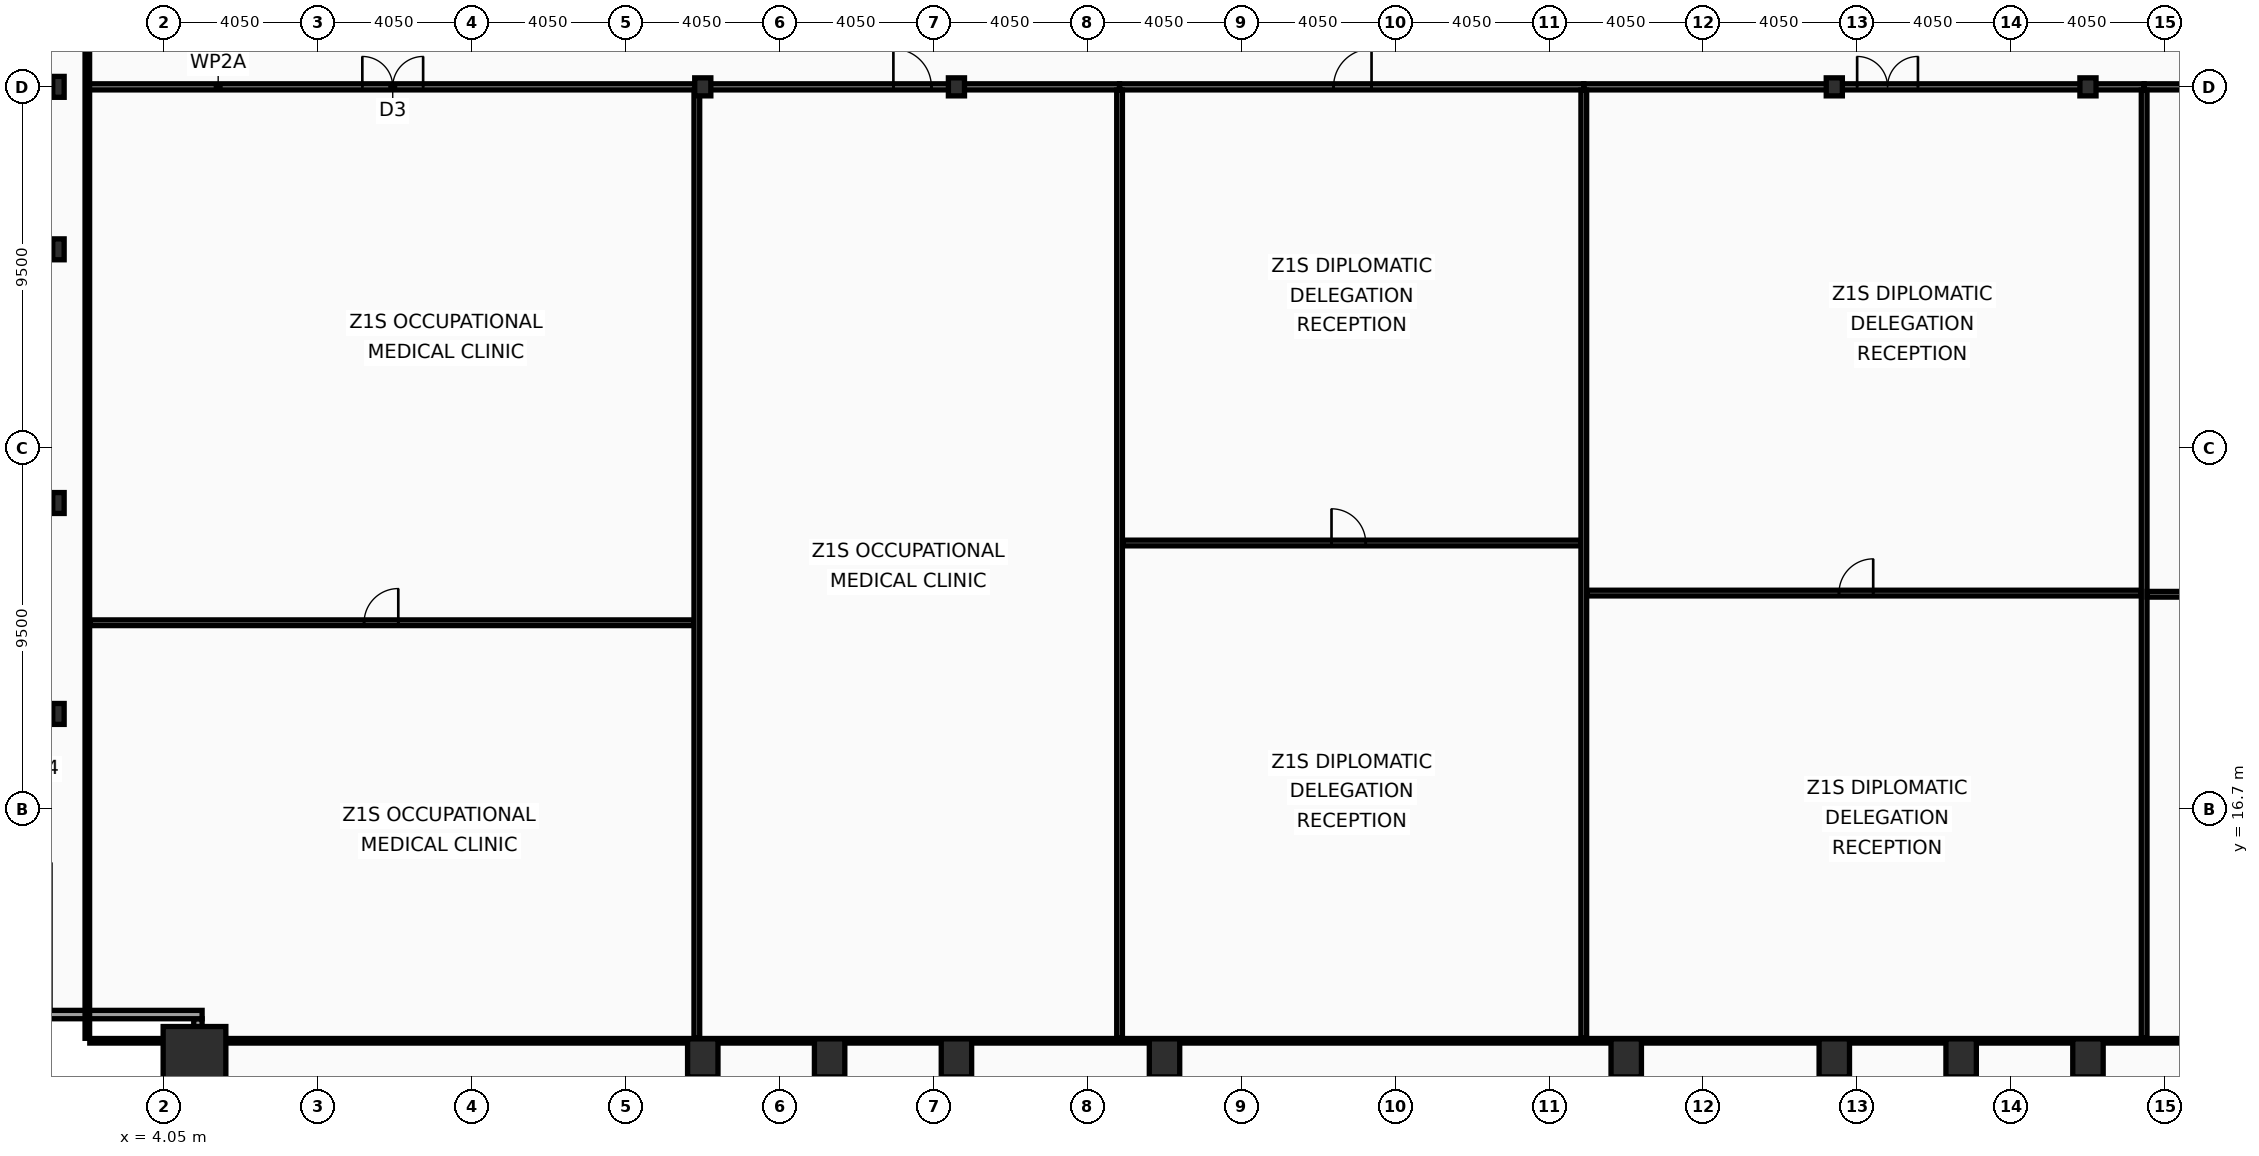
"""IFC4 building model, lengths in metres.
Left out: names, types, materials, properties, quantities, classifications, styles, units other than length and angle.
Written with IfcOpenShell. Run it as: python <this file> out.ifc"""

import sys

from ifc_helpers import new_model, si_unit, direction, frame, frame_2d, origin, origin_2d, place, context, subcontext, project, spatial, rectangle, hollow_rectangle, i_section, extrude, element, fill, save


model = new_model("IFC4")
c1 = context("Model", 3, precision=1e-05, world=origin(), true_north=direction((0.0, 1.0)))
c2 = subcontext(c1, "Body", "Model", "MODEL_VIEW")
j1 = project(units=[si_unit("LENGTHUNIT", "METRE"), si_unit("PLANEANGLEUNIT", "RADIAN")], contexts=[c1])
p1 = place(None, origin())
s1 = spatial("IfcSite", under=j1, at=p1, CompositionType="ELEMENT")
p2 = place(p1, origin())
s2 = spatial("IfcBuilding", under=s1, at=p2, CompositionType="ELEMENT")
p3 = place(p2, frame((0.0, 0.0, 73.8)))
s3 = spatial("IfcBuildingStorey", under=s2, at=p3, CompositionType="ELEMENT", Elevation=73.8)
p4 = place(p3, frame((4.85, 10.15, 0.0), z_axis=(0.0, 0.0, 1.0), x_axis=(1.0, 0.0, 0.0)))
e1 = element("IfcColumn", 1, at=p4, inside=s3, PredefinedType="COLUMN", context=c2, shape_type="SweptSolid", body=[
    extrude(hollow_rectangle(XDim=1.65, YDim=1.65, WallThickness=0.075, at=origin_2d()), origin(), (0.0, 0.0, 1.0), 4.0),
])
for number, where, z_axis, x_axis in (
    (2, (18.225, 10.15, 0.0), (0.0, 0.0, 1.0), (1.0, 0.0, 0.0)),
    (3, (21.562, 10.15, 0.0), (0.0, 0.0, 1.0), (1.0, 0.0, 0.0)),
    (4, (24.9, 10.15, 0.0), (0.0, 0.0, 1.0), (1.0, 0.0, 0.0)),
    (5, (30.375, 10.15, 0.0), (0.0, 0.0, 1.0), (1.0, 0.0, 0.0)),
    (6, (42.525, 10.15, 0.0), (0.0, 0.0, 1.0), (1.0, 0.0, 0.0)),
    (7, (48.0, 10.15, 0.0), (0.0, 0.0, 1.0), (1.0, 0.0, 0.0)),
    (8, (51.337, 10.15, 0.0), (0.0, 0.0, 1.0), (1.0, 0.0, 0.0)),
    (9, (54.675, 10.15, 0.0), (0.0, 0.0, 1.0), (1.0, 0.0, 0.0)),
):
    element("IfcColumn", number, at=place(p3, frame(where, z_axis=z_axis, x_axis=x_axis)), inside=s3, PredefinedType="COLUMN", context=c2, shape_type="SweptSolid", body=[
        extrude(hollow_rectangle(XDim=0.8, YDim=1.0, WallThickness=0.055, at=origin_2d()), origin(), (0.0, 0.0, 1.0), 4.0),
    ])
for number, where, z_axis, x_axis in (
    (10, (1.27, 19.2, 0.0), (0.0, 0.0, 1.0), (1.0, 0.0, 0.0)),
    (11, (1.27, 24.75, 0.0), (0.0, 0.0, 1.0), (1.0, 0.0, 0.0)),
    (12, (1.27, 31.425, 0.0), (0.0, 0.0, 1.0), (1.0, 0.0, 0.0)),
    (13, (1.27, 35.7, 0.0), (0.0, 0.0, 1.0), (1.0, 0.0, 0.0)),
):
    element("IfcColumn", number, at=place(p3, frame(where, z_axis=z_axis, x_axis=x_axis)), inside=s3, PredefinedType="COLUMN", context=c2, shape_type="SweptSolid", body=[
        extrude(i_section(OverallWidth=0.3, OverallDepth=0.55, WebThickness=0.015, FlangeThickness=0.029, at=origin_2d()), origin(), (0.0, 0.0, 1.0), 4.0),
    ])
for number, where, z_axis, x_axis in (
    (14, (18.225, 35.7, 0.0), (0.0, 0.0, 1.0), (1.0, 0.0, 0.0)),
    (15, (24.9, 35.7, 0.0), (0.0, 0.0, 1.0), (1.0, 0.0, 0.0)),
    (16, (48.0, 35.7, 0.0), (0.0, 0.0, 1.0), (1.0, 0.0, 0.0)),
    (17, (54.675, 35.7, 0.0), (0.0, 0.0, 1.0), (1.0, 0.0, 0.0)),
):
    element("IfcColumn", number, at=place(p3, frame(where, z_axis=z_axis, x_axis=x_axis)), inside=s3, PredefinedType="COLUMN", context=c2, shape_type="SweptSolid", body=[
        extrude(i_section(OverallWidth=0.424, OverallDepth=0.474, WebThickness=0.048, FlangeThickness=0.077, at=origin_2d()), origin(), (0.0, 0.0, 1.0), 4.0),
    ])
p5 = place(p3, frame((4.94, 7.27, 0.0), z_axis=(0.0, 0.0, 1.0), x_axis=(0.0, 1.0, 0.0)))
e18 = element("IfcWall", 18, at=p5, inside=s3, PredefinedType="SOLIDWALL", context=c2, shape_type="SweptSolid", body=[
    extrude(rectangle(XDim=3.91, YDim=0.22, at=frame_2d((1.955, 0.0))), origin(), (0.0, 0.0, 1.0), 3.16),
])
p6 = place(p3, frame((5.05, 11.29, 0.0), z_axis=(0.0, 0.0, 1.0), x_axis=(-1.0, 0.0, 0.0)))
e19 = element("IfcWall", 19, at=p6, inside=s3, PredefinedType="SOLIDWALL", context=c2, shape_type="SweptSolid", body=[
    extrude(rectangle(XDim=4.22, YDim=0.22, at=frame_2d((2.11, 0.0))), origin(), (0.0, 0.0, 1.0), 3.16),
])
p7 = place(p3, frame((2.03, 35.7, 0.0), z_axis=(0.0, 0.0, 1.0), x_axis=(1.0, 0.0, 0.0)))
e20 = element("IfcWall", 20, at=p7, inside=s3, PredefinedType="PARTITIONING", context=c2, shape_type="SweptSolid", body=[
    extrude(rectangle(XDim=16.039, YDim=0.16, at=frame_2d((8.019, 0.0))), origin(), (0.0, 0.0, 1.0), 3.01),
])
p8 = place(p7, frame((7.236, 0.0, 0.0)))
e21 = element("IfcOpeningElement", 21, at=p8, cuts=e20, PredefinedType="OPENING", context=c2, shape_type="SweptSolid", body=[
    extrude(rectangle(XDim=1.6, YDim=2.15, at=frame_2d((0.8, 1.075))), frame((0.0, 0.09, 0.0), z_axis=(0.0, -1.0, 0.0), x_axis=(1.0, 0.0, 0.0)), (0.0, 0.0, 1.0), 0.18),
])
p9 = place(p3, frame((2.095, 21.599, 0.0), z_axis=(0.0, 0.0, 1.0), x_axis=(1.0, 0.0, 0.0)))
e22 = element("IfcWall", 22, at=p9, inside=s3, PredefinedType="PARTITIONING", context=c2, shape_type="SweptSolid", body=[
    extrude(rectangle(XDim=15.894, YDim=0.15, at=frame_2d((7.947, 0.0))), origin(), (0.0, 0.0, 1.0), 3.01),
])
p10 = place(p9, frame((7.217, 0.0, 0.0)))
e23 = element("IfcOpeningElement", 23, at=p10, cuts=e22, PredefinedType="OPENING", context=c2, shape_type="SweptSolid", body=[
    extrude(rectangle(XDim=0.9, YDim=2.05, at=frame_2d((0.45, 1.025))), frame((0.0, 0.085, 0.0), z_axis=(0.0, -1.0, 0.0), x_axis=(1.0, 0.0, 0.0)), (0.0, 0.0, 1.0), 0.17),
])
p11 = place(p3, frame((18.069, 35.7, 0.0), z_axis=(0.0, 0.0, 1.0), x_axis=(1.0, 0.0, 0.0)))
e24 = element("IfcWall", 24, at=p11, inside=s3, PredefinedType="PARTITIONING", context=c2, shape_type="SweptSolid", body=[
    extrude(rectangle(XDim=11.124, YDim=0.16, at=frame_2d((5.562, 0.0))), origin(), (0.0, 0.0, 1.0), 3.01),
])
p12 = place(p11, frame((5.172, 0.0, 0.0)))
e25 = element("IfcOpeningElement", 25, at=p12, cuts=e24, PredefinedType="OPENING", context=c2, shape_type="SweptSolid", body=[
    extrude(rectangle(XDim=1.0, YDim=2.05, at=frame_2d((0.5, 1.025))), frame((0.0, 0.09, 0.0), z_axis=(0.0, -1.0, 0.0), x_axis=(1.0, 0.0, 0.0)), (0.0, 0.0, 1.0), 0.18),
])
p13 = place(p3, frame((18.069, 10.665, 0.0), z_axis=(0.0, 0.0, 1.0), x_axis=(0.0, 1.0, 0.0)))
e26 = element("IfcWall", 26, at=p13, inside=s3, PredefinedType="PARTITIONING", context=c2, shape_type="SweptSolid", body=[
    extrude(rectangle(XDim=24.95, YDim=0.15, at=frame_2d((12.475, 0.0))), origin(), (0.0, 0.0, 1.0), 3.01),
])
p14 = place(p3, frame((29.192, 35.7, 0.0), z_axis=(0.0, 0.0, 1.0), x_axis=(1.0, 0.0, 0.0)))
e27 = element("IfcWall", 27, at=p14, inside=s3, PredefinedType="PARTITIONING", context=c2, shape_type="SweptSolid", body=[
    extrude(rectangle(XDim=12.216, YDim=0.16, at=frame_2d((6.108, 0.0))), origin(), (0.0, 0.0, 1.0), 3.01),
])
p15 = place(p14, frame((5.631, 0.0, 0.0)))
e28 = element("IfcOpeningElement", 28, at=p15, cuts=e27, PredefinedType="OPENING", context=c2, shape_type="SweptSolid", body=[
    extrude(rectangle(XDim=1.0, YDim=2.05, at=frame_2d((0.5, 1.025))), frame((0.0, 0.09, 0.0), z_axis=(0.0, -1.0, 0.0), x_axis=(1.0, 0.0, 0.0)), (0.0, 0.0, 1.0), 0.18),
])
p16 = place(p3, frame((29.192, 10.665, 0.0), z_axis=(0.0, 0.0, 1.0), x_axis=(0.0, 1.0, 0.0)))
e29 = element("IfcWall", 29, at=p16, inside=s3, PredefinedType="PARTITIONING", context=c2, shape_type="SweptSolid", body=[
    extrude(rectangle(XDim=24.95, YDim=0.15, at=frame_2d((12.475, 0.0))), origin(), (0.0, 0.0, 1.0), 3.26),
])
p17 = place(p3, frame((29.272, 23.698, 0.0), z_axis=(0.0, 0.0, 1.0), x_axis=(1.0, 0.0, 0.0)))
e30 = element("IfcWall", 30, at=p17, inside=s3, PredefinedType="PARTITIONING", context=c2, shape_type="SweptSolid", body=[
    extrude(rectangle(XDim=12.056, YDim=0.15, at=frame_2d((6.028, 0.0))), origin(), (0.0, 0.0, 1.0), 3.01),
])
p18 = place(p17, frame((5.497, 0.0, 0.0)))
e31 = element("IfcOpeningElement", 31, at=p18, cuts=e30, PredefinedType="OPENING", context=c2, shape_type="SweptSolid", body=[
    extrude(rectangle(XDim=0.9, YDim=2.05, at=frame_2d((0.45, 1.025))), frame((0.0, 0.085, 0.0), z_axis=(0.0, -1.0, 0.0), x_axis=(1.0, 0.0, 0.0)), (0.0, 0.0, 1.0), 0.17),
])
p19 = place(p3, frame((41.408, 35.7, 0.0), z_axis=(0.0, 0.0, 1.0), x_axis=(1.0, 0.0, 0.0)))
e32 = element("IfcWall", 32, at=p19, inside=s3, PredefinedType="PARTITIONING", context=c2, shape_type="SweptSolid", body=[
    extrude(rectangle(XDim=14.745, YDim=0.16, at=frame_2d((7.373, 0.0))), origin(), (0.0, 0.0, 1.0), 3.01),
])
p20 = place(p19, frame((7.193, 0.0, 0.0)))
e33 = element("IfcOpeningElement", 33, at=p20, cuts=e32, PredefinedType="OPENING", context=c2, shape_type="SweptSolid", body=[
    extrude(rectangle(XDim=1.6, YDim=2.15, at=frame_2d((0.8, 1.075))), frame((0.0, 0.09, 0.0), z_axis=(0.0, -1.0, 0.0), x_axis=(1.0, 0.0, 0.0)), (0.0, 0.0, 1.0), 0.18),
])
p21 = place(p3, frame((41.408, 10.665, 0.0), z_axis=(0.0, 0.0, 1.0), x_axis=(0.0, 1.0, 0.0)))
e34 = element("IfcWall", 34, at=p21, inside=s3, PredefinedType="PARTITIONING", context=c2, shape_type="SweptSolid", body=[
    extrude(rectangle(XDim=24.95, YDim=0.15, at=frame_2d((12.475, 0.0))), origin(), (0.0, 0.0, 1.0), 3.26),
])
p22 = place(p3, frame((41.488, 22.38, 0.0), z_axis=(0.0, 0.0, 1.0), x_axis=(1.0, 0.0, 0.0)))
e35 = element("IfcWall", 35, at=p22, inside=s3, PredefinedType="PARTITIONING", context=c2, shape_type="SweptSolid", body=[
    extrude(rectangle(XDim=14.585, YDim=0.15, at=frame_2d((7.292, 0.0))), origin(), (0.0, 0.0, 1.0), 3.01),
])
p23 = place(p22, frame((6.635, 0.0, 0.0)))
e36 = element("IfcOpeningElement", 36, at=p23, cuts=e35, PredefinedType="OPENING", context=c2, shape_type="SweptSolid", body=[
    extrude(rectangle(XDim=0.9, YDim=2.05, at=frame_2d((0.45, 1.025))), frame((0.0, 0.085, 0.0), z_axis=(0.0, -1.0, 0.0), x_axis=(1.0, 0.0, 0.0)), (0.0, 0.0, 1.0), 0.17),
])
p24 = place(p3, frame((56.154, 35.7, 0.0), z_axis=(0.0, 0.0, 1.0), x_axis=(1.0, 0.0, 0.0)))
e37 = element("IfcWall", 37, at=p24, inside=s3, PredefinedType="PARTITIONING", context=c2, shape_type="SweptSolid", body=[
    extrude(rectangle(XDim=14.717, YDim=0.16, at=frame_2d((7.358, 0.0))), origin(), (0.0, 0.0, 1.0), 3.01),
])
p25 = place(p24, frame((6.681, 0.0, 0.0)))
e38 = element("IfcOpeningElement", 38, at=p25, cuts=e37, PredefinedType="OPENING", context=c2, shape_type="SweptSolid", body=[
    extrude(rectangle(XDim=1.6, YDim=2.15, at=frame_2d((0.8, 1.075))), frame((0.0, 0.09, 0.0), z_axis=(0.0, -1.0, 0.0), x_axis=(1.0, 0.0, 0.0)), (0.0, 0.0, 1.0), 0.18),
])
p26 = place(p3, frame((56.154, 10.665, 0.0), z_axis=(0.0, 0.0, 1.0), x_axis=(0.0, 1.0, 0.0)))
e39 = element("IfcWall", 39, at=p26, inside=s3, PredefinedType="PARTITIONING", context=c2, shape_type="SweptSolid", body=[
    extrude(rectangle(XDim=24.95, YDim=0.15, at=frame_2d((12.475, 0.0))), origin(), (0.0, 0.0, 1.0), 3.01),
])
p27 = place(p3, frame((56.233, 22.349, 0.0), z_axis=(0.0, 0.0, 1.0), x_axis=(1.0, 0.0, 0.0)))
e40 = element("IfcWall", 40, at=p27, inside=s3, PredefinedType="PARTITIONING", context=c2, shape_type="SweptSolid", body=[
    extrude(rectangle(XDim=14.572, YDim=0.15, at=frame_2d((7.286, 0.0))), origin(), (0.0, 0.0, 1.0), 3.82),
])
p28 = place(p27, frame((6.622, 0.0, 0.0)))
e41 = element("IfcOpeningElement", 41, at=p28, cuts=e40, PredefinedType="OPENING", context=c2, shape_type="SweptSolid", body=[
    extrude(rectangle(XDim=0.9, YDim=2.05, at=frame_2d((0.45, 1.025))), frame((0.0, 0.085, 0.0), z_axis=(0.0, -1.0, 0.0), x_axis=(1.0, 0.0, 0.0)), (0.0, 0.0, 1.0), 0.17),
])
p29 = place(p3, frame((2.03, 10.665, 0.0), z_axis=(0.0, 0.0, 1.0), x_axis=(0.0, 1.0, 0.0)))
e42 = element("IfcWall", 42, at=p29, inside=s3, PredefinedType="PARTITIONING", context=c2, shape_type="SweptSolid", body=[
    extrude(rectangle(XDim=42.11, YDim=0.12, at=frame_2d((21.055, 0.0))), origin(), (0.0, 0.0, 1.0), 3.01),
])
p30 = place(p3, frame((2.095, 10.6, 0.0), z_axis=(0.0, 0.0, 1.0), x_axis=(1.0, 0.0, 0.0)))
e43 = element("IfcWall", 43, at=p30, inside=s3, PredefinedType="PARTITIONING", context=c2, shape_type="SweptSolid", body=[
    extrude(rectangle(XDim=68.71, YDim=0.12, at=frame_2d((34.355, 0.0))), origin(), (0.0, 0.0, 1.0), 3.01),
])
p31 = place(p8, origin())
e44 = element("IfcDoor", 44, at=p31, inside=s3, OperationType="DOUBLE_DOOR_SINGLE_SWING", PredefinedType="DOOR", context=c2, shape_type="SweptSolid", body=[
    extrude(rectangle(XDim=1.6, YDim=2.15, at=frame_2d((0.8, 1.075))), frame((0.0, 0.025, 0.0), z_axis=(0.0, -1.0, 0.0), x_axis=(1.0, 0.0, 0.0)), (0.0, 0.0, 1.0), 0.05),
])
fill(e21, e44)
p32 = place(p10, origin())
e45 = element("IfcDoor", 45, at=p32, inside=s3, OperationType="SINGLE_SWING_RIGHT", PredefinedType="DOOR", context=c2, shape_type="SweptSolid", body=[
    extrude(rectangle(XDim=0.9, YDim=2.05, at=frame_2d((0.45, 1.025))), frame((0.0, 0.025, 0.0), z_axis=(0.0, -1.0, 0.0), x_axis=(1.0, 0.0, 0.0)), (0.0, 0.0, 1.0), 0.05),
])
fill(e23, e45)
p33 = place(p12, origin())
e46 = element("IfcDoor", 46, at=p33, inside=s3, OperationType="SINGLE_SWING_LEFT", PredefinedType="DOOR", context=c2, shape_type="SweptSolid", body=[
    extrude(rectangle(XDim=1.0, YDim=2.05, at=frame_2d((0.5, 1.025))), frame((0.0, 0.025, 0.0), z_axis=(0.0, -1.0, 0.0), x_axis=(1.0, 0.0, 0.0)), (0.0, 0.0, 1.0), 0.05),
])
fill(e25, e46)
p34 = place(p15, origin())
e47 = element("IfcDoor", 47, at=p34, inside=s3, OperationType="SINGLE_SWING_RIGHT", PredefinedType="DOOR", context=c2, shape_type="SweptSolid", body=[
    extrude(rectangle(XDim=1.0, YDim=2.05, at=frame_2d((0.5, 1.025))), frame((0.0, 0.025, 0.0), z_axis=(0.0, -1.0, 0.0), x_axis=(1.0, 0.0, 0.0)), (0.0, 0.0, 1.0), 0.05),
])
fill(e28, e47)
p35 = place(p18, origin())
e48 = element("IfcDoor", 48, at=p35, inside=s3, OperationType="SINGLE_SWING_LEFT", PredefinedType="DOOR", context=c2, shape_type="SweptSolid", body=[
    extrude(rectangle(XDim=0.9, YDim=2.05, at=frame_2d((0.45, 1.025))), frame((0.0, 0.025, 0.0), z_axis=(0.0, -1.0, 0.0), x_axis=(1.0, 0.0, 0.0)), (0.0, 0.0, 1.0), 0.05),
])
fill(e31, e48)
p36 = place(p20, origin())
e49 = element("IfcDoor", 49, at=p36, inside=s3, OperationType="DOUBLE_DOOR_SINGLE_SWING", PredefinedType="DOOR", context=c2, shape_type="SweptSolid", body=[
    extrude(rectangle(XDim=1.6, YDim=2.15, at=frame_2d((0.8, 1.075))), frame((0.0, 0.025, 0.0), z_axis=(0.0, -1.0, 0.0), x_axis=(1.0, 0.0, 0.0)), (0.0, 0.0, 1.0), 0.05),
])
fill(e33, e49)
p37 = place(p23, origin())
e50 = element("IfcDoor", 50, at=p37, inside=s3, OperationType="SINGLE_SWING_RIGHT", PredefinedType="DOOR", context=c2, shape_type="SweptSolid", body=[
    extrude(rectangle(XDim=0.9, YDim=2.05, at=frame_2d((0.45, 1.025))), frame((0.0, 0.025, 0.0), z_axis=(0.0, -1.0, 0.0), x_axis=(1.0, 0.0, 0.0)), (0.0, 0.0, 1.0), 0.05),
])
fill(e36, e50)
save(model, sys.argv[1])
